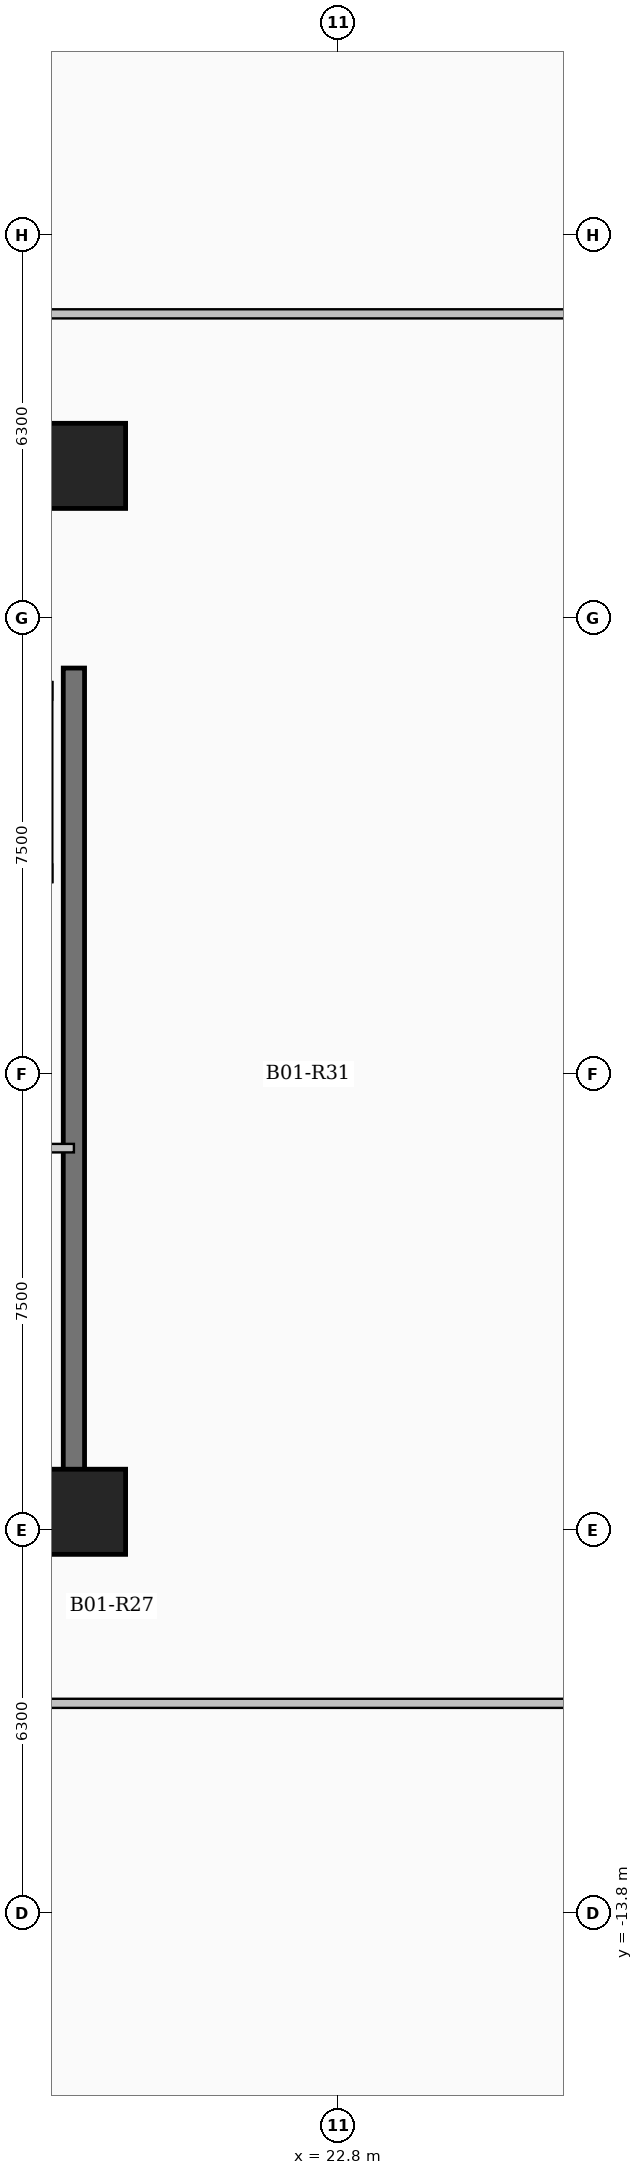
"""IFC4 building model, lengths in metres.
Left out: names, types, materials, properties, quantities, classifications, styles, units other than length and angle.
Written with IfcOpenShell. Run it as: python <this file> out.ifc"""

import sys

from ifc_helpers import new_model, si_unit, direction, frame, frame_2d, origin, origin_2d, place, context, subcontext, project, spatial, rectangle, extrude, element, save


model = new_model("IFC4")
c1 = context("Model", 3, precision=1e-05, world=origin(), true_north=direction((0.0, 1.0)))
c2 = subcontext(c1, "Body", "Model", "MODEL_VIEW")
j1 = project(units=[si_unit("LENGTHUNIT", "METRE"), si_unit("PLANEANGLEUNIT", "RADIAN")], contexts=[c1])
p1 = place(None, origin())
s1 = spatial("IfcSite", under=j1, at=p1, CompositionType="ELEMENT")
p2 = place(p1, origin())
s2 = spatial("IfcBuilding", under=s1, at=p2, CompositionType="ELEMENT")
p3 = place(p2, frame((0.0, 0.0, -4.6)))
s3 = spatial("IfcBuildingStorey", under=s2, at=p3, CompositionType="ELEMENT", Elevation=-4.6)
for number, where, z_axis, x_axis in (
    (1, (18.6, -7.2, 0.0), (0.0, 0.0, 1.0), (1.0, 0.0, 0.0)),
    (2, (18.6, 10.0, 0.0), (0.0, 0.0, 1.0), (1.0, 0.0, 0.0)),
):
    element("IfcColumn", number, at=place(p3, frame(where, z_axis=z_axis, x_axis=x_axis)), inside=s3, PredefinedType="COLUMN", context=c2, shape_type="SweptSolid", body=[
        extrude(rectangle(XDim=1.4, YDim=1.4, at=origin_2d()), origin(), (0.0, 0.0, 1.0), 4.6),
    ])
p4 = place(p3, frame((18.45, -7.375, 0.0), z_axis=(0.0, 0.0, 1.0), x_axis=(0.0, 1.0, 0.0)))
e3 = element("IfcWall", 3, at=p4, inside=s3, PredefinedType="SHEAR", context=c2, shape_type="SweptSolid", body=[
    extrude(rectangle(XDim=14.05, YDim=0.35, at=frame_2d((7.025, 0.0))), origin(), (0.0, 0.0, 1.0), 4.6),
])
p5 = place(p3, frame((10.075, -7.2, 0.0), z_axis=(0.0, 0.0, 1.0), x_axis=(1.0, 0.0, 0.0)))
e4 = element("IfcWall", 4, at=p5, inside=s3, PredefinedType="SHEAR", context=c2, shape_type="SweptSolid", body=[
    extrude(rectangle(XDim=8.55, YDim=0.35, at=frame_2d((4.275, 0.0))), origin(), (0.0, 0.0, 1.0), 4.6),
])
p6 = place(p3, frame((15.4, -1.22, 0.0), z_axis=(0.0, 0.0, 1.0), x_axis=(1.0, 0.0, 0.0)))
e5 = element("IfcWall", 5, at=p6, inside=s3, PredefinedType="PARTITIONING", context=c2, shape_type="SweptSolid", body=[
    extrude(rectangle(XDim=3.05, YDim=0.14, at=frame_2d((1.525, 0.0))), origin(), (0.0, 0.0, 1.0), 4.3),
])
p7 = place(p6, frame((1.05, 0.0, 0.0)))
e6 = element("IfcOpeningElement", 6, at=p7, cuts=e5, PredefinedType="OPENING", context=c2, shape_type="SweptSolid", body=[
    extrude(rectangle(XDim=0.9, YDim=2.08, at=frame_2d((0.45, 1.04))), frame((0.0, 0.08, 0.0), z_axis=(0.0, -1.0, 0.0), x_axis=(1.0, 0.0, 0.0)), (0.0, 0.0, 1.0), 0.16),
])
p8 = place(p3, frame((3.85, 12.5, 0.0), z_axis=(0.0, 0.0, 1.0), x_axis=(1.0, 0.0, 0.0)))
e7 = element("IfcWall", 7, at=p8, inside=s3, PredefinedType="PARTITIONING", context=c2, shape_type="SweptSolid", body=[
    extrude(rectangle(XDim=24.15, YDim=0.15, at=frame_2d((12.075, 0.0))), origin(), (0.0, 0.0, 1.0), 4.3),
])
p9 = place(p3, frame((8.55, -10.35, 0.0), z_axis=(0.0, 0.0, 1.0), x_axis=(1.0, 0.0, 0.0)))
e8 = element("IfcWall", 8, at=p9, inside=s3, PredefinedType="PARTITIONING", context=c2, shape_type="SweptSolid", body=[
    extrude(rectangle(XDim=19.45, YDim=0.15, at=frame_2d((9.725, 0.0))), origin(), (0.0, 0.0, 1.0), 4.3),
])
save(model, sys.argv[1])
